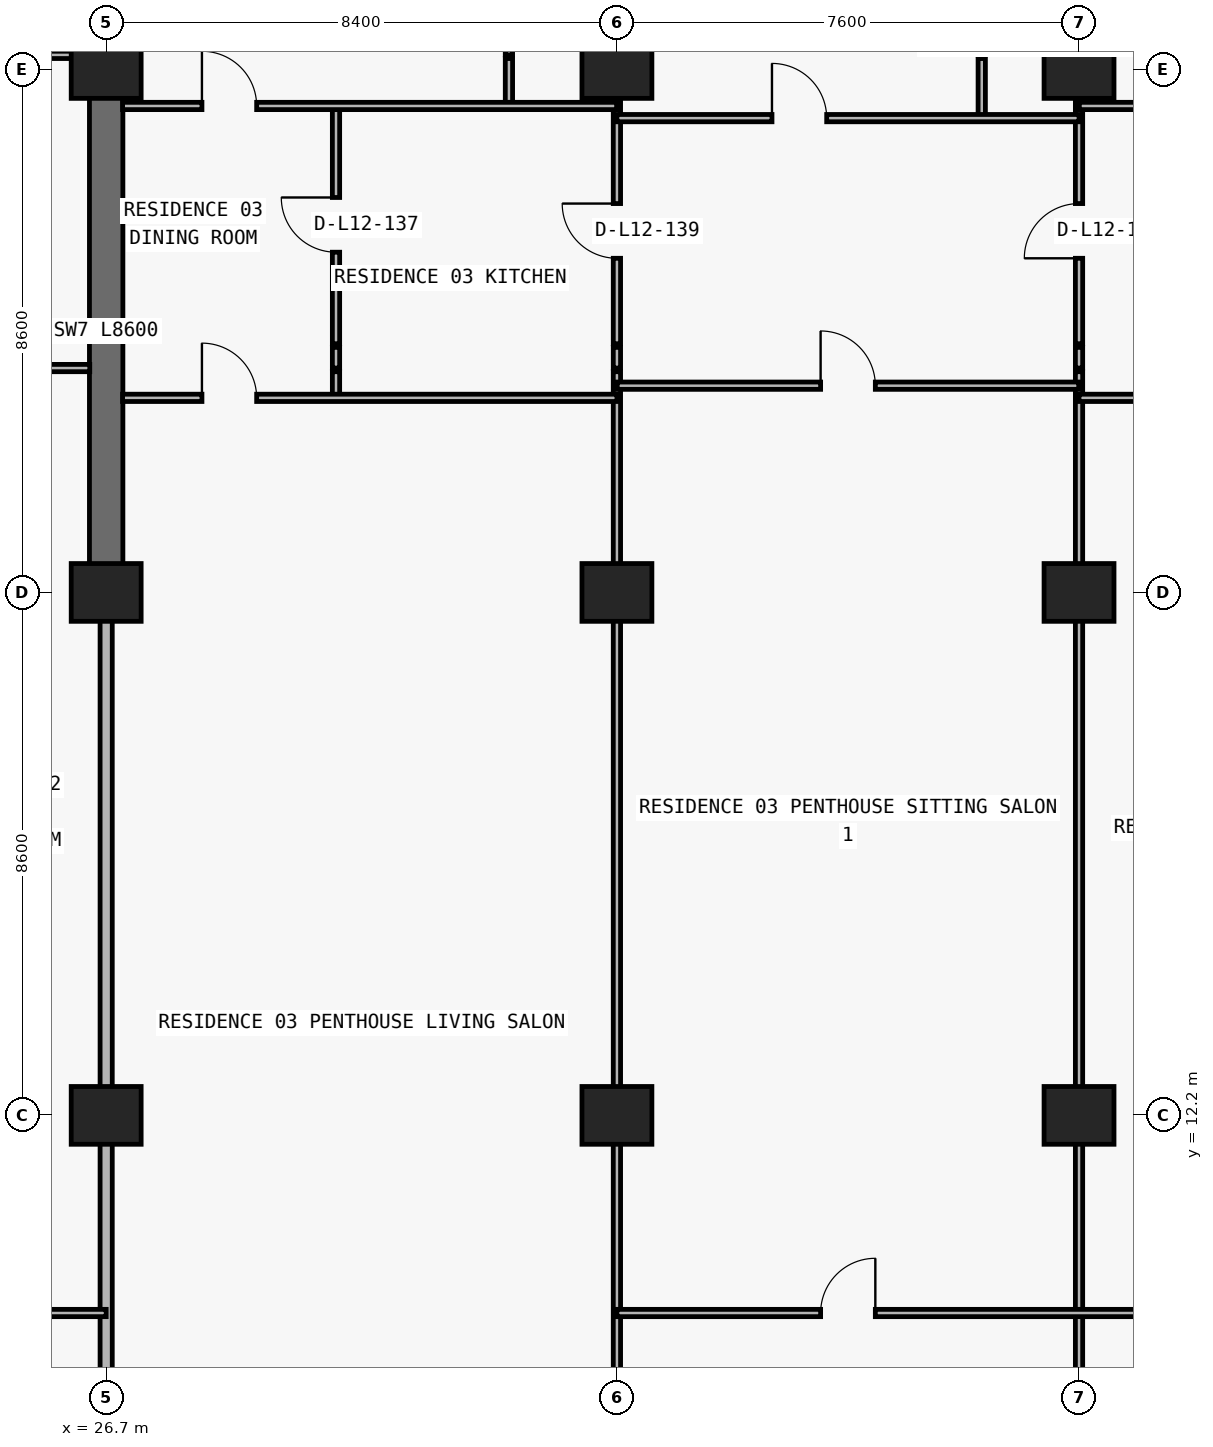
"""IFC4 building model, lengths in metres.
Left out: names, types, materials, properties, quantities, classifications, styles, units other than length and angle.
Written with IfcOpenShell. Run it as: python <this file> out.ifc"""

import sys

from ifc_helpers import new_model, si_unit, direction, frame, frame_2d, origin, origin_2d, place, context, subcontext, project, spatial, rectangle, extrude, element, fill, save


model = new_model("IFC4")
c1 = context("Model", 3, precision=1e-05, world=origin(), true_north=direction((0.0, 1.0)))
c2 = subcontext(c1, "Body", "Model", "MODEL_VIEW")
j1 = project(units=[si_unit("LENGTHUNIT", "METRE"), si_unit("PLANEANGLEUNIT", "RADIAN")], contexts=[c1])
p1 = place(None, origin())
s1 = spatial("IfcSite", under=j1, at=p1, CompositionType="ELEMENT")
p2 = place(p1, origin())
s2 = spatial("IfcBuilding", under=s1, at=p2, CompositionType="ELEMENT")
p3 = place(p2, frame((0.0, 0.0, 49.8)))
s3 = spatial("IfcBuildingStorey", under=s2, at=p3, CompositionType="ELEMENT", Elevation=49.8)
for number, where, z_axis, x_axis in (
    (1, (26.7, 12.2, 0.0), (0.0, 0.0, 1.0), (1.0, 0.0, 0.0)),
    (2, (35.1, 12.2, 0.0), (0.0, 0.0, 1.0), (1.0, 0.0, 0.0)),
    (3, (42.7, 12.2, 0.0), (0.0, 0.0, 1.0), (1.0, 0.0, 0.0)),
    (4, (26.7, 20.8, 0.0), (0.0, 0.0, 1.0), (1.0, 0.0, 0.0)),
    (5, (35.1, 20.8, 0.0), (0.0, 0.0, 1.0), (1.0, 0.0, 0.0)),
    (6, (42.7, 20.8, 0.0), (0.0, 0.0, 1.0), (1.0, 0.0, 0.0)),
    (7, (26.7, 29.4, 0.0), (0.0, 0.0, 1.0), (1.0, 0.0, 0.0)),
    (8, (35.1, 29.4, 0.0), (0.0, 0.0, 1.0), (1.0, 0.0, 0.0)),
    (9, (42.7, 29.4, 0.0), (0.0, 0.0, 1.0), (1.0, 0.0, 0.0)),
):
    element("IfcColumn", number, at=place(p3, frame(where, z_axis=z_axis, x_axis=x_axis)), inside=s3, PredefinedType="COLUMN", context=c2, shape_type="SweptSolid", body=[
        extrude(rectangle(XDim=1.15, YDim=0.95, at=origin_2d()), origin(), (0.0, 0.0, 1.0), 3.05),
    ])
p4 = place(p3, frame((26.7, 20.8, 0.0), z_axis=(0.0, 0.0, 1.0), x_axis=(0.0, 1.0, 0.0)))
e10 = element("IfcWall", 10, at=p4, inside=s3, PredefinedType="SHEAR", context=c2, shape_type="SweptSolid", body=[
    extrude(rectangle(XDim=8.6, YDim=0.55, at=frame_2d((4.3, 0.0))), origin(), (0.0, 0.0, 1.0), 3.05),
])
p5 = place(p3, frame((26.7, 6.24, 0.0), z_axis=(0.0, 0.0, 1.0), x_axis=(0.0, 1.0, 0.0)))
e11 = element("IfcWall", 11, at=p5, inside=s3, PredefinedType="PARTITIONING", context=c2, shape_type="SweptSolid", body=[
    extrude(rectangle(XDim=14.555, YDim=0.2, at=frame_2d((7.277, 0.0))), origin(), (0.0, 0.0, 1.0), 2.11),
])
p6 = place(p3, frame((26.7, 29.64, 0.0), z_axis=(0.0, 0.0, 1.0), x_axis=(0.0, 1.0, 0.0)))
e12 = element("IfcWall", 12, at=p6, inside=s3, PredefinedType="PARTITIONING", context=c2, shape_type="SweptSolid", body=[
    extrude(rectangle(XDim=0.34, YDim=0.2, at=frame_2d((0.17, 0.0))), origin(), (0.0, 0.0, 1.0), 2.335),
])
p7 = place(p3, frame((30.48, 24.0, 0.0), z_axis=(0.0, 0.0, 1.0), x_axis=(0.0, 1.0, 0.0)))
e13 = element("IfcWall", 13, at=p7, inside=s3, PredefinedType="PARTITIONING", context=c2, shape_type="SweptSolid", body=[
    extrude(rectangle(XDim=0.43, YDim=0.12, at=frame_2d((0.215, 0.0))), origin(), (0.0, 0.0, 1.0), 3.05),
])
p8 = place(p3, frame((30.48, 24.49, 0.0), z_axis=(0.0, 0.0, 1.0), x_axis=(0.0, 1.0, 0.0)))
e14 = element("IfcWall", 14, at=p8, inside=s3, PredefinedType="PARTITIONING", context=c2, shape_type="SweptSolid", body=[
    extrude(rectangle(XDim=0.34, YDim=0.12, at=frame_2d((0.17, 0.0))), origin(), (0.0, 0.0, 1.0), 3.05),
])
p9 = place(p3, frame((30.48, 24.89, 0.0), z_axis=(0.0, 0.0, 1.0), x_axis=(0.0, 1.0, 0.0)))
e15 = element("IfcWall", 15, at=p9, inside=s3, PredefinedType="PARTITIONING", context=c2, shape_type="SweptSolid", body=[
    extrude(rectangle(XDim=3.91, YDim=0.12, at=frame_2d((1.955, 0.0))), origin(), (0.0, 0.0, 1.0), 3.05),
])
p10 = place(p9, frame((1.505, 0.0, 0.0)))
e16 = element("IfcOpeningElement", 16, at=p10, cuts=e15, PredefinedType="OPENING", context=c2, shape_type="SweptSolid", body=[
    extrude(rectangle(XDim=0.9, YDim=2.15, at=frame_2d((0.45, 1.075))), frame((0.0, 0.07, 0.0), z_axis=(0.0, -1.0, 0.0), x_axis=(1.0, 0.0, 0.0)), (0.0, 0.0, 1.0), 0.14),
])
p11 = place(p3, frame((33.324, 28.8, 0.0), z_axis=(0.0, 0.0, 1.0), x_axis=(0.0, 1.0, 0.0)))
e17 = element("IfcWall", 17, at=p11, inside=s3, PredefinedType="PARTITIONING", context=c2, shape_type="SweptSolid", body=[
    extrude(rectangle(XDim=0.78, YDim=0.12, at=frame_2d((0.39, 0.0))), origin(), (0.0, 0.0, 1.0), 3.05),
])
p12 = place(p3, frame((33.324, 29.64, 0.0), z_axis=(0.0, 0.0, 1.0), x_axis=(0.0, 1.0, 0.0)))
e18 = element("IfcWall", 18, at=p12, inside=s3, PredefinedType="PARTITIONING", context=c2, shape_type="SweptSolid", body=[
    extrude(rectangle(XDim=0.34, YDim=0.12, at=frame_2d((0.17, 0.0))), origin(), (0.0, 0.0, 1.0), 3.05),
])
p13 = place(p3, frame((35.1, 6.24, 0.0), z_axis=(0.0, 0.0, 1.0), x_axis=(0.0, 1.0, 0.0)))
e19 = element("IfcWall", 19, at=p13, inside=s3, PredefinedType="PARTITIONING", context=c2, shape_type="SweptSolid", body=[
    extrude(rectangle(XDim=18.19, YDim=0.12, at=frame_2d((9.095, 0.0))), origin(), (0.0, 0.0, 1.0), 2.11),
])
p14 = place(p3, frame((35.1, 24.49, 0.0), z_axis=(0.0, 0.0, 1.0), x_axis=(0.0, 1.0, 0.0)))
e20 = element("IfcWall", 20, at=p14, inside=s3, PredefinedType="PARTITIONING", context=c2, shape_type="SweptSolid", body=[
    extrude(rectangle(XDim=0.34, YDim=0.12, at=frame_2d((0.17, 0.0))), origin(), (0.0, 0.0, 1.0), 2.11),
])
p15 = place(p3, frame((35.1, 24.89, 0.0), z_axis=(0.0, 0.0, 1.0), x_axis=(0.0, 1.0, 0.0)))
e21 = element("IfcWall", 21, at=p15, inside=s3, PredefinedType="PARTITIONING", context=c2, shape_type="SweptSolid", body=[
    extrude(rectangle(XDim=4.69, YDim=0.12, at=frame_2d((2.345, 0.0))), origin(), (0.0, 0.0, 1.0), 2.11),
])
p16 = place(p15, frame((1.405, 0.0, 0.0)))
e22 = element("IfcOpeningElement", 22, at=p16, cuts=e21, PredefinedType="OPENING", context=c2, shape_type="SweptSolid", body=[
    extrude(rectangle(XDim=0.9, YDim=2.06, at=frame_2d((0.45, 1.03))), frame((0.0, 0.07, 0.0), z_axis=(0.0, -1.0, 0.0), x_axis=(1.0, 0.0, 0.0)), (0.0, 0.0, 1.0), 0.14),
])
p17 = place(p3, frame((35.1, 29.64, 0.0), z_axis=(0.0, 0.0, 1.0), x_axis=(0.0, 1.0, 0.0)))
e23 = element("IfcWall", 23, at=p17, inside=s3, PredefinedType="PARTITIONING", context=c2, shape_type="SweptSolid", body=[
    extrude(rectangle(XDim=0.34, YDim=0.12, at=frame_2d((0.17, 0.0))), origin(), (0.0, 0.0, 1.0), 2.11),
])
p18 = place(p3, frame((41.1, 28.6, 0.0), z_axis=(0.0, 0.0, 1.0), x_axis=(0.0, 1.0, 0.0)))
e24 = element("IfcWall", 24, at=p18, inside=s3, PredefinedType="PARTITIONING", context=c2, shape_type="SweptSolid", body=[
    extrude(rectangle(XDim=0.98, YDim=0.12, at=frame_2d((0.49, 0.0))), origin(), (0.0, 0.0, 1.0), 3.05),
])
p19 = place(p3, frame((41.1, 29.64, 0.0), z_axis=(0.0, 0.0, 1.0), x_axis=(0.0, 1.0, 0.0)))
e25 = element("IfcWall", 25, at=p19, inside=s3, PredefinedType="PARTITIONING", context=c2, shape_type="SweptSolid", body=[
    extrude(rectangle(XDim=0.34, YDim=0.12, at=frame_2d((0.17, 0.0))), origin(), (0.0, 0.0, 1.0), 3.05),
])
p20 = place(p3, frame((42.7, 6.24, 0.0), z_axis=(0.0, 0.0, 1.0), x_axis=(0.0, 1.0, 0.0)))
e26 = element("IfcWall", 26, at=p20, inside=s3, PredefinedType="PARTITIONING", context=c2, shape_type="SweptSolid", body=[
    extrude(rectangle(XDim=18.19, YDim=0.12, at=frame_2d((9.095, 0.0))), origin(), (0.0, 0.0, 1.0), 2.11),
])
p21 = place(p3, frame((42.7, 24.49, 0.0), z_axis=(0.0, 0.0, 1.0), x_axis=(0.0, 1.0, 0.0)))
e27 = element("IfcWall", 27, at=p21, inside=s3, PredefinedType="PARTITIONING", context=c2, shape_type="SweptSolid", body=[
    extrude(rectangle(XDim=0.34, YDim=0.12, at=frame_2d((0.17, 0.0))), origin(), (0.0, 0.0, 1.0), 2.11),
])
p22 = place(p3, frame((42.7, 24.89, 0.0), z_axis=(0.0, 0.0, 1.0), x_axis=(0.0, 1.0, 0.0)))
e28 = element("IfcWall", 28, at=p22, inside=s3, PredefinedType="PARTITIONING", context=c2, shape_type="SweptSolid", body=[
    extrude(rectangle(XDim=4.69, YDim=0.12, at=frame_2d((2.345, 0.0))), origin(), (0.0, 0.0, 1.0), 2.11),
])
p23 = place(p22, frame((1.405, 0.0, 0.0)))
e29 = element("IfcOpeningElement", 29, at=p23, cuts=e28, PredefinedType="OPENING", context=c2, shape_type="SweptSolid", body=[
    extrude(rectangle(XDim=0.9, YDim=2.06, at=frame_2d((0.45, 1.03))), frame((0.0, 0.07, 0.0), z_axis=(0.0, -1.0, 0.0), x_axis=(1.0, 0.0, 0.0)), (0.0, 0.0, 1.0), 0.14),
])
p24 = place(p3, frame((42.7, 29.64, 0.0), z_axis=(0.0, 0.0, 1.0), x_axis=(0.0, 1.0, 0.0)))
e30 = element("IfcWall", 30, at=p24, inside=s3, PredefinedType="PARTITIONING", context=c2, shape_type="SweptSolid", body=[
    extrude(rectangle(XDim=0.34, YDim=0.12, at=frame_2d((0.17, 0.0))), origin(), (0.0, 0.0, 1.0), 2.11),
])
p25 = place(p3, frame((22.92, 8.95, 0.0), z_axis=(0.0, 0.0, 1.0), x_axis=(1.0, 0.0, 0.0)))
e31 = element("IfcWall", 31, at=p25, inside=s3, PredefinedType="PARTITIONING", context=c2, shape_type="SweptSolid", body=[
    extrude(rectangle(XDim=3.78, YDim=0.12, at=frame_2d((1.89, 0.0))), origin(), (0.0, 0.0, 1.0), 3.05),
])
p26 = place(p25, frame((1.44, 0.0, 0.0)))
e32 = element("IfcOpeningElement", 32, at=p26, cuts=e31, PredefinedType="OPENING", context=c2, shape_type="SweptSolid", body=[
    extrude(rectangle(XDim=0.9, YDim=2.15, at=frame_2d((0.45, 1.075))), frame((0.0, 0.07, 0.0), z_axis=(0.0, -1.0, 0.0), x_axis=(1.0, 0.0, 0.0)), (0.0, 0.0, 1.0), 0.14),
])
p27 = place(p3, frame((35.1, 8.95, 0.0), z_axis=(0.0, 0.0, 1.0), x_axis=(1.0, 0.0, 0.0)))
e33 = element("IfcWall", 33, at=p27, inside=s3, PredefinedType="PARTITIONING", context=c2, shape_type="SweptSolid", body=[
    extrude(rectangle(XDim=16.0, YDim=0.12, at=frame_2d((8.0, 0.0))), origin(), (0.0, 0.0, 1.0), 3.05),
])
p28 = place(p27, frame((3.35, 0.0, 0.0)))
e34 = element("IfcOpeningElement", 34, at=p28, cuts=e33, PredefinedType="OPENING", context=c2, shape_type="SweptSolid", body=[
    extrude(rectangle(XDim=0.9, YDim=2.15, at=frame_2d((0.45, 1.075))), frame((0.0, 0.07, 0.0), z_axis=(0.0, -1.0, 0.0), x_axis=(1.0, 0.0, 0.0)), (0.0, 0.0, 1.0), 0.14),
])
p29 = place(p27, frame((11.35, 0.0, 0.0)))
e35 = element("IfcOpeningElement", 35, at=p29, cuts=e33, PredefinedType="OPENING", context=c2, shape_type="SweptSolid", body=[
    extrude(rectangle(XDim=0.9, YDim=2.15, at=frame_2d((0.45, 1.075))), frame((0.0, 0.07, 0.0), z_axis=(0.0, -1.0, 0.0), x_axis=(1.0, 0.0, 0.0)), (0.0, 0.0, 1.0), 0.14),
])
p30 = place(p3, frame((26.97, 24.0, 0.0), z_axis=(0.0, 0.0, 1.0), x_axis=(1.0, 0.0, 0.0)))
e36 = element("IfcWall", 36, at=p30, inside=s3, PredefinedType="PARTITIONING", context=c2, shape_type="SweptSolid", body=[
    extrude(rectangle(XDim=8.13, YDim=0.12, at=frame_2d((4.065, 0.0))), origin(), (0.0, 0.0, 1.0), 3.05),
])
p31 = place(p30, frame((1.305, 0.0, 0.0)))
e37 = element("IfcOpeningElement", 37, at=p31, cuts=e36, PredefinedType="OPENING", context=c2, shape_type="SweptSolid", body=[
    extrude(rectangle(XDim=0.9, YDim=2.15, at=frame_2d((0.45, 1.075))), frame((0.0, 0.07, 0.0), z_axis=(0.0, -1.0, 0.0), x_axis=(1.0, 0.0, 0.0)), (0.0, 0.0, 1.0), 0.14),
])
p32 = place(p3, frame((42.7, 24.0, 0.0), z_axis=(0.0, 0.0, 1.0), x_axis=(1.0, 0.0, 0.0)))
e38 = element("IfcWall", 38, at=p32, inside=s3, PredefinedType="PARTITIONING", context=c2, shape_type="SweptSolid", body=[
    extrude(rectangle(XDim=8.13, YDim=0.12, at=frame_2d((4.065, 0.0))), origin(), (0.0, 0.0, 1.0), 3.05),
])
p33 = place(p32, frame((3.615, 0.0, 0.0)))
e39 = element("IfcOpeningElement", 39, at=p33, cuts=e38, PredefinedType="OPENING", context=c2, shape_type="SweptSolid", body=[
    extrude(rectangle(XDim=0.9, YDim=2.15, at=frame_2d((0.45, 1.075))), frame((0.0, 0.07, 0.0), z_axis=(0.0, -1.0, 0.0), x_axis=(1.0, 0.0, 0.0)), (0.0, 0.0, 1.0), 0.14),
])
p34 = place(p3, frame((35.105, 24.2, 0.0), z_axis=(0.0, 0.0, 1.0), x_axis=(1.0, 0.0, 0.0)))
e40 = element("IfcWall", 40, at=p34, inside=s3, PredefinedType="PARTITIONING", context=c2, shape_type="SweptSolid", body=[
    extrude(rectangle(XDim=7.59, YDim=0.12, at=frame_2d((3.795, 0.0))), origin(), (0.0, 0.0, 1.0), 3.05),
])
p35 = place(p34, frame((3.345, 0.0, 0.0)))
e41 = element("IfcOpeningElement", 41, at=p35, cuts=e40, PredefinedType="OPENING", context=c2, shape_type="SweptSolid", body=[
    extrude(rectangle(XDim=0.9, YDim=2.15, at=frame_2d((0.45, 1.075))), frame((0.0, 0.07, 0.0), z_axis=(0.0, -1.0, 0.0), x_axis=(1.0, 0.0, 0.0)), (0.0, 0.0, 1.0), 0.14),
])
p36 = place(p3, frame((18.3, 24.49, 0.0), z_axis=(0.0, 0.0, 1.0), x_axis=(1.0, 0.0, 0.0)))
e42 = element("IfcWall", 42, at=p36, inside=s3, PredefinedType="PARTITIONING", context=c2, shape_type="SweptSolid", body=[
    extrude(rectangle(XDim=8.13, YDim=0.12, at=frame_2d((4.065, 0.0))), origin(), (0.0, 0.0, 1.0), 3.05),
])
p37 = place(p36, frame((1.818, 0.0, 0.0)))
e43 = element("IfcOpeningElement", 43, at=p37, cuts=e42, PredefinedType="OPENING", context=c2, shape_type="SweptSolid", body=[
    extrude(rectangle(XDim=0.9, YDim=2.15, at=frame_2d((0.45, 1.075))), frame((0.0, 0.07, 0.0), z_axis=(0.0, -1.0, 0.0), x_axis=(1.0, 0.0, 0.0)), (0.0, 0.0, 1.0), 0.14),
])
p38 = place(p36, frame((5.925, 0.0, 0.0)))
e44 = element("IfcOpeningElement", 44, at=p38, cuts=e42, PredefinedType="OPENING", context=c2, shape_type="SweptSolid", body=[
    extrude(rectangle(XDim=0.9, YDim=2.15, at=frame_2d((0.45, 1.075))), frame((0.0, 0.07, 0.0), z_axis=(0.0, -1.0, 0.0), x_axis=(1.0, 0.0, 0.0)), (0.0, 0.0, 1.0), 0.14),
])
p39 = place(p3, frame((35.1, 28.6, 0.0), z_axis=(0.0, 0.0, 1.0), x_axis=(1.0, 0.0, 0.0)))
e45 = element("IfcWall", 45, at=p39, inside=s3, PredefinedType="PARTITIONING", context=c2, shape_type="SweptSolid", body=[
    extrude(rectangle(XDim=7.6, YDim=0.12, at=frame_2d((3.8, 0.0))), origin(), (0.0, 0.0, 1.0), 3.05),
])
p40 = place(p39, frame((2.55, 0.0, 0.0)))
e46 = element("IfcOpeningElement", 46, at=p40, cuts=e45, PredefinedType="OPENING", context=c2, shape_type="SweptSolid", body=[
    extrude(rectangle(XDim=0.9, YDim=2.15, at=frame_2d((0.45, 1.075))), frame((0.0, 0.07, 0.0), z_axis=(0.0, -1.0, 0.0), x_axis=(1.0, 0.0, 0.0)), (0.0, 0.0, 1.0), 0.14),
])
p41 = place(p3, frame((26.97, 28.8, 0.0), z_axis=(0.0, 0.0, 1.0), x_axis=(1.0, 0.0, 0.0)))
e47 = element("IfcWall", 47, at=p41, inside=s3, PredefinedType="PARTITIONING", context=c2, shape_type="SweptSolid", body=[
    extrude(rectangle(XDim=8.125, YDim=0.12, at=frame_2d((4.062, 0.0))), origin(), (0.0, 0.0, 1.0), 3.05),
])
p42 = place(p41, frame((1.305, 0.0, 0.0)))
e48 = element("IfcOpeningElement", 48, at=p42, cuts=e47, PredefinedType="OPENING", context=c2, shape_type="SweptSolid", body=[
    extrude(rectangle(XDim=0.9, YDim=2.15, at=frame_2d((0.45, 1.075))), frame((0.0, 0.07, 0.0), z_axis=(0.0, -1.0, 0.0), x_axis=(1.0, 0.0, 0.0)), (0.0, 0.0, 1.0), 0.14),
])
p43 = place(p3, frame((42.705, 28.8, 0.0), z_axis=(0.0, 0.0, 1.0), x_axis=(1.0, 0.0, 0.0)))
e49 = element("IfcWall", 49, at=p43, inside=s3, PredefinedType="PARTITIONING", context=c2, shape_type="SweptSolid", body=[
    extrude(rectangle(XDim=8.125, YDim=0.12, at=frame_2d((4.062, 0.0))), origin(), (0.0, 0.0, 1.0), 3.05),
])
p44 = place(p43, frame((2.877, 0.0, 0.0)))
e50 = element("IfcOpeningElement", 50, at=p44, cuts=e49, PredefinedType="OPENING", context=c2, shape_type="SweptSolid", body=[
    extrude(rectangle(XDim=0.9, YDim=2.15, at=frame_2d((0.45, 1.075))), frame((0.0, 0.07, 0.0), z_axis=(0.0, -1.0, 0.0), x_axis=(1.0, 0.0, 0.0)), (0.0, 0.0, 1.0), 0.14),
])
p45 = place(p3, frame((18.3, 29.64, 0.0), z_axis=(0.0, 0.0, 1.0), x_axis=(1.0, 0.0, 0.0)))
e51 = element("IfcWall", 51, at=p45, inside=s3, PredefinedType="PARTITIONING", context=c2, shape_type="SweptSolid", body=[
    extrude(rectangle(XDim=8.4, YDim=0.12, at=frame_2d((4.2, 0.0))), origin(), (0.0, 0.0, 1.0), 2.11),
])
p46 = place(p45, frame((1.818, 0.0, 0.0)))
e52 = element("IfcOpeningElement", 52, at=p46, cuts=e51, PredefinedType="OPENING", context=c2, shape_type="SweptSolid", body=[
    extrude(rectangle(XDim=0.9, YDim=2.06, at=frame_2d((0.45, 1.03))), frame((0.0, 0.07, 0.0), z_axis=(0.0, -1.0, 0.0), x_axis=(1.0, 0.0, 0.0)), (0.0, 0.0, 1.0), 0.14),
])
p47 = place(p42, origin())
e53 = element("IfcDoor", 53, at=p47, inside=s3, OperationType="SINGLE_SWING_LEFT", PredefinedType="DOOR", context=c2, shape_type="SweptSolid", body=[
    extrude(rectangle(XDim=0.9, YDim=2.15, at=frame_2d((0.45, 1.075))), frame((0.0, 0.025, 0.0), z_axis=(0.0, -1.0, 0.0), x_axis=(1.0, 0.0, 0.0)), (0.0, 0.0, 1.0), 0.05),
])
fill(e48, e53)
p48 = place(p10, origin())
e54 = element("IfcDoor", 54, at=p48, inside=s3, OperationType="SINGLE_SWING_RIGHT", PredefinedType="DOOR", context=c2, shape_type="SweptSolid", body=[
    extrude(rectangle(XDim=0.9, YDim=2.15, at=frame_2d((0.45, 1.075))), frame((0.0, 0.025, 0.0), z_axis=(0.0, -1.0, 0.0), x_axis=(1.0, 0.0, 0.0)), (0.0, 0.0, 1.0), 0.05),
])
fill(e16, e54)
p49 = place(p31, origin())
e55 = element("IfcDoor", 55, at=p49, inside=s3, OperationType="SINGLE_SWING_LEFT", PredefinedType="DOOR", context=c2, shape_type="SweptSolid", body=[
    extrude(rectangle(XDim=0.9, YDim=2.15, at=frame_2d((0.45, 1.075))), frame((0.0, 0.025, 0.0), z_axis=(0.0, -1.0, 0.0), x_axis=(1.0, 0.0, 0.0)), (0.0, 0.0, 1.0), 0.05),
])
fill(e37, e55)
p50 = place(p16, origin())
e56 = element("IfcDoor", 56, at=p50, inside=s3, OperationType="SINGLE_SWING_RIGHT", PredefinedType="DOOR", context=c2, shape_type="SweptSolid", body=[
    extrude(rectangle(XDim=0.9, YDim=2.06, at=frame_2d((0.45, 1.03))), frame((0.0, 0.025, 0.0), z_axis=(0.0, -1.0, 0.0), x_axis=(1.0, 0.0, 0.0)), (0.0, 0.0, 1.0), 0.05),
])
fill(e22, e56)
p51 = place(p40, origin())
e57 = element("IfcDoor", 57, at=p51, inside=s3, OperationType="SINGLE_SWING_LEFT", PredefinedType="DOOR", context=c2, shape_type="SweptSolid", body=[
    extrude(rectangle(XDim=0.9, YDim=2.15, at=frame_2d((0.45, 1.075))), frame((0.0, 0.025, 0.0), z_axis=(0.0, -1.0, 0.0), x_axis=(1.0, 0.0, 0.0)), (0.0, 0.0, 1.0), 0.05),
])
fill(e46, e57)
p52 = place(p35, origin())
e58 = element("IfcDoor", 58, at=p52, inside=s3, OperationType="SINGLE_SWING_LEFT", PredefinedType="DOOR", context=c2, shape_type="SweptSolid", body=[
    extrude(rectangle(XDim=0.9, YDim=2.15, at=frame_2d((0.45, 1.075))), frame((0.0, 0.025, 0.0), z_axis=(0.0, -1.0, 0.0), x_axis=(1.0, 0.0, 0.0)), (0.0, 0.0, 1.0), 0.05),
])
fill(e41, e58)
p53 = place(p28, origin())
e59 = element("IfcDoor", 59, at=p53, inside=s3, OperationType="SINGLE_SWING_RIGHT", PredefinedType="DOOR", context=c2, shape_type="SweptSolid", body=[
    extrude(rectangle(XDim=0.9, YDim=2.15, at=frame_2d((0.45, 1.075))), frame((0.0, 0.025, 0.0), z_axis=(0.0, -1.0, 0.0), x_axis=(1.0, 0.0, 0.0)), (0.0, 0.0, 1.0), 0.05),
])
fill(e34, e59)
p54 = place(p23, origin())
e60 = element("IfcDoor", 60, at=p54, inside=s3, OperationType="SINGLE_SWING_LEFT", PredefinedType="DOOR", context=c2, shape_type="SweptSolid", body=[
    extrude(rectangle(XDim=0.9, YDim=2.06, at=frame_2d((0.45, 1.03))), frame((0.0, 0.025, 0.0), z_axis=(0.0, -1.0, 0.0), x_axis=(1.0, 0.0, 0.0)), (0.0, 0.0, 1.0), 0.05),
])
fill(e29, e60)
save(model, sys.argv[1])
